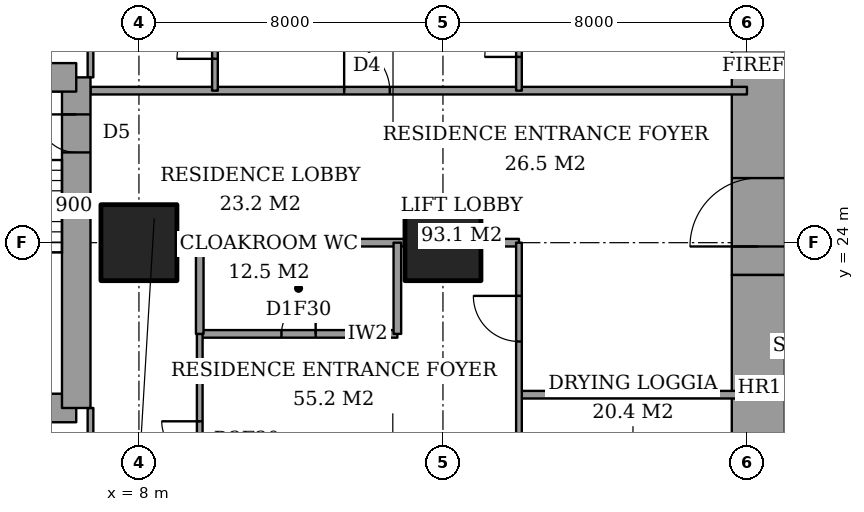
"""IFC4 building model, lengths in metres.
Left out: names, types, materials, properties, quantities, classifications, styles, units other than length and angle.
Written with IfcOpenShell. Run it as: python <this file> out.ifc"""

import sys

from ifc_helpers import new_model, si_unit, direction, frame, frame_2d, origin, origin_2d, place, context, subcontext, project, spatial, rectangle, extrude, element, fill, save


model = new_model("IFC4")
c1 = context("Model", 3, precision=1e-05, world=origin(), true_north=direction((0.0, 1.0)))
c2 = subcontext(c1, "Body", "Model", "MODEL_VIEW")
j1 = project(units=[si_unit("LENGTHUNIT", "METRE"), si_unit("PLANEANGLEUNIT", "RADIAN")], contexts=[c1])
p1 = place(None, origin())
s1 = spatial("IfcSite", under=j1, at=p1, CompositionType="ELEMENT")
p2 = place(p1, origin())
s2 = spatial("IfcBuilding", under=s1, at=p2, CompositionType="ELEMENT")
p3 = place(p2, frame((0.0, 0.0, 87.2)))
s3 = spatial("IfcBuildingStorey", under=s2, at=p3, CompositionType="ELEMENT", Elevation=87.2)
for number, where, z_axis, x_axis in (
    (1, (8.0, 24.0, 0.0), (0.0, 0.0, 1.0), (1.0, 0.0, 0.0)),
    (2, (16.0, 24.0, 0.0), (0.0, 0.0, 1.0), (1.0, 0.0, 0.0)),
):
    element("IfcColumn", number, at=place(p3, frame(where, z_axis=z_axis, x_axis=x_axis)), inside=s3, PredefinedType="COLUMN", context=c2, shape_type="SweptSolid", body=[
        extrude(rectangle(XDim=2.0, YDim=2.0, at=origin_2d()), origin(), (0.0, 0.0, 1.0), 3.6),
    ])
p4 = place(p3, frame((24.3, 13.0, 0.0), z_axis=(0.0, 0.0, 1.0), x_axis=(0.0, 1.0, 0.0)))
e3 = element("IfcWall", 3, at=p4, inside=s3, PredefinedType="SHEAR", context=c2, shape_type="SweptSolid", body=[
    extrude(rectangle(XDim=10.15, YDim=1.4, at=frame_2d((5.075, 0.0))), origin(), (0.0, 0.0, 1.0), 3.6),
])
p5 = place(p3, frame((24.3, 23.15, 0.0), z_axis=(0.0, 0.0, 1.0), x_axis=(0.0, 1.0, 0.0)))
e4 = element("IfcWall", 4, at=p5, inside=s3, PredefinedType="SHEAR", context=c2, shape_type="SweptSolid", body=[
    extrude(rectangle(XDim=11.85, YDim=1.4, at=frame_2d((5.925, 0.0))), origin(), (0.0, 0.0, 1.0), 3.6),
])
p6 = place(p5, frame((0.75, 0.0, 0.0)))
e5 = element("IfcOpeningElement", 5, at=p6, cuts=e4, PredefinedType="OPENING", context=c2, shape_type="SweptSolid", body=[
    extrude(rectangle(XDim=1.8, YDim=2.4, at=frame_2d((0.9, 1.2))), frame((0.0, 0.71, 0.0), z_axis=(0.0, -1.0, 0.0), x_axis=(1.0, 0.0, 0.0)), (0.0, 0.0, 1.0), 1.42),
])
p7 = place(p3, frame((1.9, 19.65, 0.0), z_axis=(0.0, 0.0, 1.0), x_axis=(1.0, 0.0, 0.0)))
e6 = element("IfcWall", 6, at=p7, inside=s3, PredefinedType="SHEAR", context=c2, shape_type="SweptSolid", body=[
    extrude(rectangle(XDim=4.45, YDim=0.75, at=frame_2d((2.225, 0.0))), origin(), (0.0, 0.0, 1.0), 3.6),
])
p8 = place(p3, frame((6.35, 19.65, 0.0), z_axis=(0.0, 0.0, 1.0), x_axis=(0.0, 1.0, 0.0)))
e7 = element("IfcWall", 7, at=p8, inside=s3, PredefinedType="SHEAR", context=c2, shape_type="SweptSolid", body=[
    extrude(rectangle(XDim=8.7, YDim=0.75, at=frame_2d((4.35, 0.0))), origin(), (0.0, 0.0, 1.0), 3.6),
])
p9 = place(p8, frame((6.725, 0.0, 0.0)))
e8 = element("IfcOpeningElement", 8, at=p9, cuts=e7, PredefinedType="OPENING", context=c2, shape_type="SweptSolid", body=[
    extrude(rectangle(XDim=1.0, YDim=2.1, at=frame_2d((0.5, 1.05))), frame((0.0, 0.385, 0.0), z_axis=(0.0, -1.0, 0.0), x_axis=(1.0, 0.0, 0.0)), (0.0, 0.0, 1.0), 0.77),
])
p10 = place(p3, frame((6.35, 28.35, 0.0), z_axis=(0.0, 0.0, 1.0), x_axis=(-1.0, 0.0, 0.0)))
e9 = element("IfcWall", 9, at=p10, inside=s3, PredefinedType="SHEAR", context=c2, shape_type="SweptSolid", body=[
    extrude(rectangle(XDim=4.45, YDim=0.75, at=frame_2d((2.225, 0.0))), origin(), (0.0, 0.0, 1.0), 3.6),
])
p11 = place(p3, frame((18.0, 20.0, 0.0), z_axis=(0.0, 0.0, 1.0), x_axis=(1.0, 0.0, 0.0)))
e10 = element("IfcWall", 10, at=p11, inside=s3, PredefinedType="PARTITIONING", context=c2, shape_type="SweptSolid", body=[
    extrude(rectangle(XDim=6.0, YDim=0.2, at=frame_2d((3.0, 0.0))), origin(), (0.0, 0.0, 1.0), 3.25),
])
p12 = place(p3, frame((9.6, 21.6, 0.0), z_axis=(0.0, 0.0, 1.0), x_axis=(1.0, 0.0, 0.0)))
e11 = element("IfcWall", 11, at=p12, inside=s3, PredefinedType="PARTITIONING", context=c2, shape_type="SweptSolid", body=[
    extrude(rectangle(XDim=5.2, YDim=0.2, at=frame_2d((2.6, 0.0))), origin(), (0.0, 0.0, 1.0), 3.25),
])
p13 = place(p12, frame((2.15, 0.0, 0.0)))
e12 = element("IfcOpeningElement", 12, at=p13, cuts=e11, PredefinedType="OPENING", context=c2, shape_type="SweptSolid", body=[
    extrude(rectangle(XDim=0.9, YDim=2.1, at=frame_2d((0.45, 1.05))), frame((0.0, 0.11, 0.0), z_axis=(0.0, -1.0, 0.0), x_axis=(1.0, 0.0, 0.0)), (0.0, 0.0, 1.0), 0.22),
])
p14 = place(p3, frame((9.0, 24.0, 0.0), z_axis=(0.0, 0.0, 1.0), x_axis=(1.0, 0.0, 0.0)))
e13 = element("IfcWall", 13, at=p14, inside=s3, PredefinedType="PARTITIONING", context=c2, shape_type="SweptSolid", body=[
    extrude(rectangle(XDim=6.0, YDim=0.2, at=frame_2d((3.0, 0.0))), origin(), (0.0, 0.0, 1.0), 3.25),
])
p15 = place(p3, frame((17.0, 24.0, 0.0), z_axis=(0.0, 0.0, 1.0), x_axis=(1.0, 0.0, 0.0)))
e14 = element("IfcWall", 14, at=p15, inside=s3, PredefinedType="PARTITIONING", context=c2, shape_type="SweptSolid", body=[
    extrude(rectangle(XDim=1.0, YDim=0.2, at=frame_2d((0.5, 0.0))), origin(), (0.0, 0.0, 1.0), 3.25),
])
p16 = place(p3, frame((6.725, 28.0, 0.0), z_axis=(0.0, 0.0, 1.0), x_axis=(1.0, 0.0, 0.0)))
e15 = element("IfcWall", 15, at=p16, inside=s3, PredefinedType="PARTITIONING", context=c2, shape_type="SweptSolid", body=[
    extrude(rectangle(XDim=17.275, YDim=0.2, at=frame_2d((8.637, 0.0))), origin(), (0.0, 0.0, 1.0), 3.25),
])
p17 = place(p16, frame((6.675, 0.0, 0.0)))
e16 = element("IfcOpeningElement", 16, at=p17, cuts=e15, PredefinedType="OPENING", context=c2, shape_type="SweptSolid", body=[
    extrude(rectangle(XDim=1.2, YDim=2.4, at=frame_2d((0.6, 1.2))), frame((0.0, 0.11, 0.0), z_axis=(0.0, -1.0, 0.0), x_axis=(1.0, 0.0, 0.0)), (0.0, 0.0, 1.0), 0.22),
])
p18 = place(p3, frame((6.725, 17.2, 0.0), z_axis=(0.0, 0.0, 1.0), x_axis=(0.0, 1.0, 0.0)))
e17 = element("IfcWall", 17, at=p18, inside=s3, PredefinedType="PARTITIONING", context=c2, shape_type="SweptSolid", body=[
    extrude(rectangle(XDim=2.45, YDim=0.15, at=frame_2d((1.225, 0.0))), origin(), (0.0, 0.0, 1.0), 3.25),
])
p19 = place(p18, frame((0.538, 0.0, 0.0)))
e18 = element("IfcOpeningElement", 18, at=p19, cuts=e17, PredefinedType="OPENING", context=c2, shape_type="SweptSolid", body=[
    extrude(rectangle(XDim=1.0, YDim=2.1, at=frame_2d((0.5, 1.05))), frame((0.0, 0.085, 0.0), z_axis=(0.0, -1.0, 0.0), x_axis=(1.0, 0.0, 0.0)), (0.0, 0.0, 1.0), 0.17),
])
p20 = place(p3, frame((6.725, 28.35, 0.0), z_axis=(0.0, 0.0, 1.0), x_axis=(0.0, 1.0, 0.0)))
e19 = element("IfcWall", 19, at=p20, inside=s3, PredefinedType="PARTITIONING", context=c2, shape_type="SweptSolid", body=[
    extrude(rectangle(XDim=2.45, YDim=0.15, at=frame_2d((1.225, 0.0))), origin(), (0.0, 0.0, 1.0), 3.25),
])
p21 = place(p20, frame((0.962, 0.0, 0.0)))
e20 = element("IfcOpeningElement", 20, at=p21, cuts=e19, PredefinedType="OPENING", context=c2, shape_type="SweptSolid", body=[
    extrude(rectangle(XDim=0.9, YDim=2.1, at=frame_2d((0.45, 1.05))), frame((0.0, 0.085, 0.0), z_axis=(0.0, -1.0, 0.0), x_axis=(1.0, 0.0, 0.0)), (0.0, 0.0, 1.0), 0.17),
])
p22 = place(p3, frame((9.6, 21.6, 0.0), z_axis=(0.0, 0.0, 1.0), x_axis=(0.0, 1.0, 0.0)))
e21 = element("IfcWall", 21, at=p22, inside=s3, PredefinedType="PARTITIONING", context=c2, shape_type="SweptSolid", body=[
    extrude(rectangle(XDim=2.4, YDim=0.2, at=frame_2d((1.2, 0.0))), origin(), (0.0, 0.0, 1.0), 3.25),
])
p23 = place(p3, frame((9.6, 10.6, 0.0), z_axis=(0.0, 0.0, 1.0), x_axis=(0.0, 1.0, 0.0)))
e22 = element("IfcWall", 22, at=p23, inside=s3, PredefinedType="PARTITIONING", context=c2, shape_type="SweptSolid", body=[
    extrude(rectangle(XDim=11.0, YDim=0.15, at=frame_2d((5.5, 0.0))), origin(), (0.0, 0.0, 1.0), 3.25),
])
p24 = place(p23, frame((7.7, 0.0, 0.0)))
e23 = element("IfcOpeningElement", 23, at=p24, cuts=e22, PredefinedType="OPENING", context=c2, shape_type="SweptSolid", body=[
    extrude(rectangle(XDim=1.0, YDim=2.1, at=frame_2d((0.5, 1.05))), frame((0.0, 0.085, 0.0), z_axis=(0.0, -1.0, 0.0), x_axis=(1.0, 0.0, 0.0)), (0.0, 0.0, 1.0), 0.17),
])
p25 = place(p3, frame((10.0, 28.0, 0.0), z_axis=(0.0, 0.0, 1.0), x_axis=(0.0, 1.0, 0.0)))
e24 = element("IfcWall", 24, at=p25, inside=s3, PredefinedType="PARTITIONING", context=c2, shape_type="SweptSolid", body=[
    extrude(rectangle(XDim=3.0, YDim=0.15, at=frame_2d((1.5, 0.0))), origin(), (0.0, 0.0, 1.0), 3.25),
])
p26 = place(p25, frame((0.837, 0.0, 0.0)))
e25 = element("IfcOpeningElement", 25, at=p26, cuts=e24, PredefinedType="OPENING", context=c2, shape_type="SweptSolid", body=[
    extrude(rectangle(XDim=1.0, YDim=2.1, at=frame_2d((0.5, 1.05))), frame((0.0, 0.085, 0.0), z_axis=(0.0, -1.0, 0.0), x_axis=(1.0, 0.0, 0.0)), (0.0, 0.0, 1.0), 0.17),
])
p27 = place(p3, frame((14.8, 21.6, 0.0), z_axis=(0.0, 0.0, 1.0), x_axis=(0.0, 1.0, 0.0)))
e26 = element("IfcWall", 26, at=p27, inside=s3, PredefinedType="PARTITIONING", context=c2, shape_type="SweptSolid", body=[
    extrude(rectangle(XDim=2.4, YDim=0.2, at=frame_2d((1.2, 0.0))), origin(), (0.0, 0.0, 1.0), 3.25),
])
p28 = place(p3, frame((18.0, 10.6, 0.0), z_axis=(0.0, 0.0, 1.0), x_axis=(0.0, 1.0, 0.0)))
e27 = element("IfcWall", 27, at=p28, inside=s3, PredefinedType="PARTITIONING", context=c2, shape_type="SweptSolid", body=[
    extrude(rectangle(XDim=13.4, YDim=0.15, at=frame_2d((6.7, 0.0))), origin(), (0.0, 0.0, 1.0), 3.25),
])
p29 = place(p28, frame((10.8, 0.0, 0.0)))
e28 = element("IfcOpeningElement", 28, at=p29, cuts=e27, PredefinedType="OPENING", context=c2, shape_type="SweptSolid", body=[
    extrude(rectangle(XDim=1.2, YDim=2.4, at=frame_2d((0.6, 1.2))), frame((0.0, 0.085, 0.0), z_axis=(0.0, -1.0, 0.0), x_axis=(1.0, 0.0, 0.0)), (0.0, 0.0, 1.0), 0.17),
])
p30 = place(p28, frame((7.25, 0.0, 0.0)))
e29 = element("IfcOpeningElement", 29, at=p30, cuts=e27, PredefinedType="OPENING", context=c2, shape_type="SweptSolid", body=[
    extrude(rectangle(XDim=0.9, YDim=2.1, at=frame_2d((0.45, 1.05))), frame((0.0, 0.085, 0.0), z_axis=(0.0, -1.0, 0.0), x_axis=(1.0, 0.0, 0.0)), (0.0, 0.0, 1.0), 0.17),
])
p31 = place(p3, frame((18.0, 28.0, 0.0), z_axis=(0.0, 0.0, 1.0), x_axis=(0.0, 1.0, 0.0)))
e30 = element("IfcWall", 30, at=p31, inside=s3, PredefinedType="PARTITIONING", context=c2, shape_type="SweptSolid", body=[
    extrude(rectangle(XDim=9.4, YDim=0.15, at=frame_2d((4.7, 0.0))), origin(), (0.0, 0.0, 1.0), 3.25),
])
p32 = place(p31, frame((0.887, 0.0, 0.0)))
e31 = element("IfcOpeningElement", 31, at=p32, cuts=e30, PredefinedType="OPENING", context=c2, shape_type="SweptSolid", body=[
    extrude(rectangle(XDim=0.9, YDim=2.1, at=frame_2d((0.45, 1.05))), frame((0.0, 0.085, 0.0), z_axis=(0.0, -1.0, 0.0), x_axis=(1.0, 0.0, 0.0)), (0.0, 0.0, 1.0), 0.17),
])
p33 = place(p24, origin())
e32 = element("IfcDoor", 32, at=p33, inside=s3, OperationType="SINGLE_SWING_LEFT", PredefinedType="DOOR", context=c2, shape_type="SweptSolid", body=[
    extrude(rectangle(XDim=1.0, YDim=2.1, at=frame_2d((0.5, 1.05))), frame((0.0, 0.025, 0.0), z_axis=(0.0, -1.0, 0.0), x_axis=(1.0, 0.0, 0.0)), (0.0, 0.0, 1.0), 0.05),
])
fill(e23, e32)
p34 = place(p13, origin())
e33 = element("IfcDoor", 33, at=p34, inside=s3, OperationType="SINGLE_SWING_LEFT", PredefinedType="DOOR", context=c2, shape_type="SweptSolid", body=[
    extrude(rectangle(XDim=0.9, YDim=2.1, at=frame_2d((0.45, 1.05))), frame((0.0, 0.025, 0.0), z_axis=(0.0, -1.0, 0.0), x_axis=(1.0, 0.0, 0.0)), (0.0, 0.0, 1.0), 0.05),
])
fill(e12, e33)
p35 = place(p29, origin())
e34 = element("IfcDoor", 34, at=p35, inside=s3, OperationType="SINGLE_SWING_LEFT", PredefinedType="DOOR", context=c2, shape_type="SweptSolid", body=[
    extrude(rectangle(XDim=1.2, YDim=2.4, at=frame_2d((0.6, 1.2))), frame((0.0, 0.025, 0.0), z_axis=(0.0, -1.0, 0.0), x_axis=(1.0, 0.0, 0.0)), (0.0, 0.0, 1.0), 0.05),
])
fill(e28, e34)
p36 = place(p26, origin())
e35 = element("IfcDoor", 35, at=p36, inside=s3, OperationType="SINGLE_SWING_RIGHT", PredefinedType="DOOR", context=c2, shape_type="SweptSolid", body=[
    extrude(rectangle(XDim=1.0, YDim=2.1, at=frame_2d((0.5, 1.05))), frame((0.0, 0.025, 0.0), z_axis=(0.0, -1.0, 0.0), x_axis=(1.0, 0.0, 0.0)), (0.0, 0.0, 1.0), 0.05),
])
fill(e25, e35)
p37 = place(p17, origin())
e36 = element("IfcDoor", 36, at=p37, inside=s3, OperationType="SINGLE_SWING_RIGHT", PredefinedType="DOOR", context=c2, shape_type="SweptSolid", body=[
    extrude(rectangle(XDim=1.2, YDim=2.4, at=frame_2d((0.6, 1.2))), frame((0.0, 0.025, 0.0), z_axis=(0.0, -1.0, 0.0), x_axis=(1.0, 0.0, 0.0)), (0.0, 0.0, 1.0), 0.05),
])
fill(e16, e36)
p38 = place(p32, origin())
e37 = element("IfcDoor", 37, at=p38, inside=s3, OperationType="SINGLE_SWING_RIGHT", PredefinedType="DOOR", context=c2, shape_type="SweptSolid", body=[
    extrude(rectangle(XDim=0.9, YDim=2.1, at=frame_2d((0.45, 1.05))), frame((0.0, 0.025, 0.0), z_axis=(0.0, -1.0, 0.0), x_axis=(1.0, 0.0, 0.0)), (0.0, 0.0, 1.0), 0.05),
])
fill(e31, e37)
p39 = place(p6, origin())
e38 = element("IfcDoor", 38, at=p39, inside=s3, OperationType="DOUBLE_DOOR_DOUBLE_SWING", PredefinedType="DOOR", context=c2, shape_type="SweptSolid", body=[
    extrude(rectangle(XDim=1.8, YDim=2.4, at=frame_2d((0.9, 1.2))), frame((0.0, 0.025, 0.0), z_axis=(0.0, -1.0, 0.0), x_axis=(1.0, 0.0, 0.0)), (0.0, 0.0, 1.0), 0.05),
])
fill(e5, e38)
p40 = place(p9, origin())
e39 = element("IfcDoor", 39, at=p40, inside=s3, OperationType="SINGLE_SWING_LEFT", PredefinedType="DOOR", context=c2, shape_type="SweptSolid", body=[
    extrude(rectangle(XDim=1.0, YDim=2.1, at=frame_2d((0.5, 1.05))), frame((0.0, 0.025, 0.0), z_axis=(0.0, -1.0, 0.0), x_axis=(1.0, 0.0, 0.0)), (0.0, 0.0, 1.0), 0.05),
])
fill(e8, e39)
save(model, sys.argv[1])
